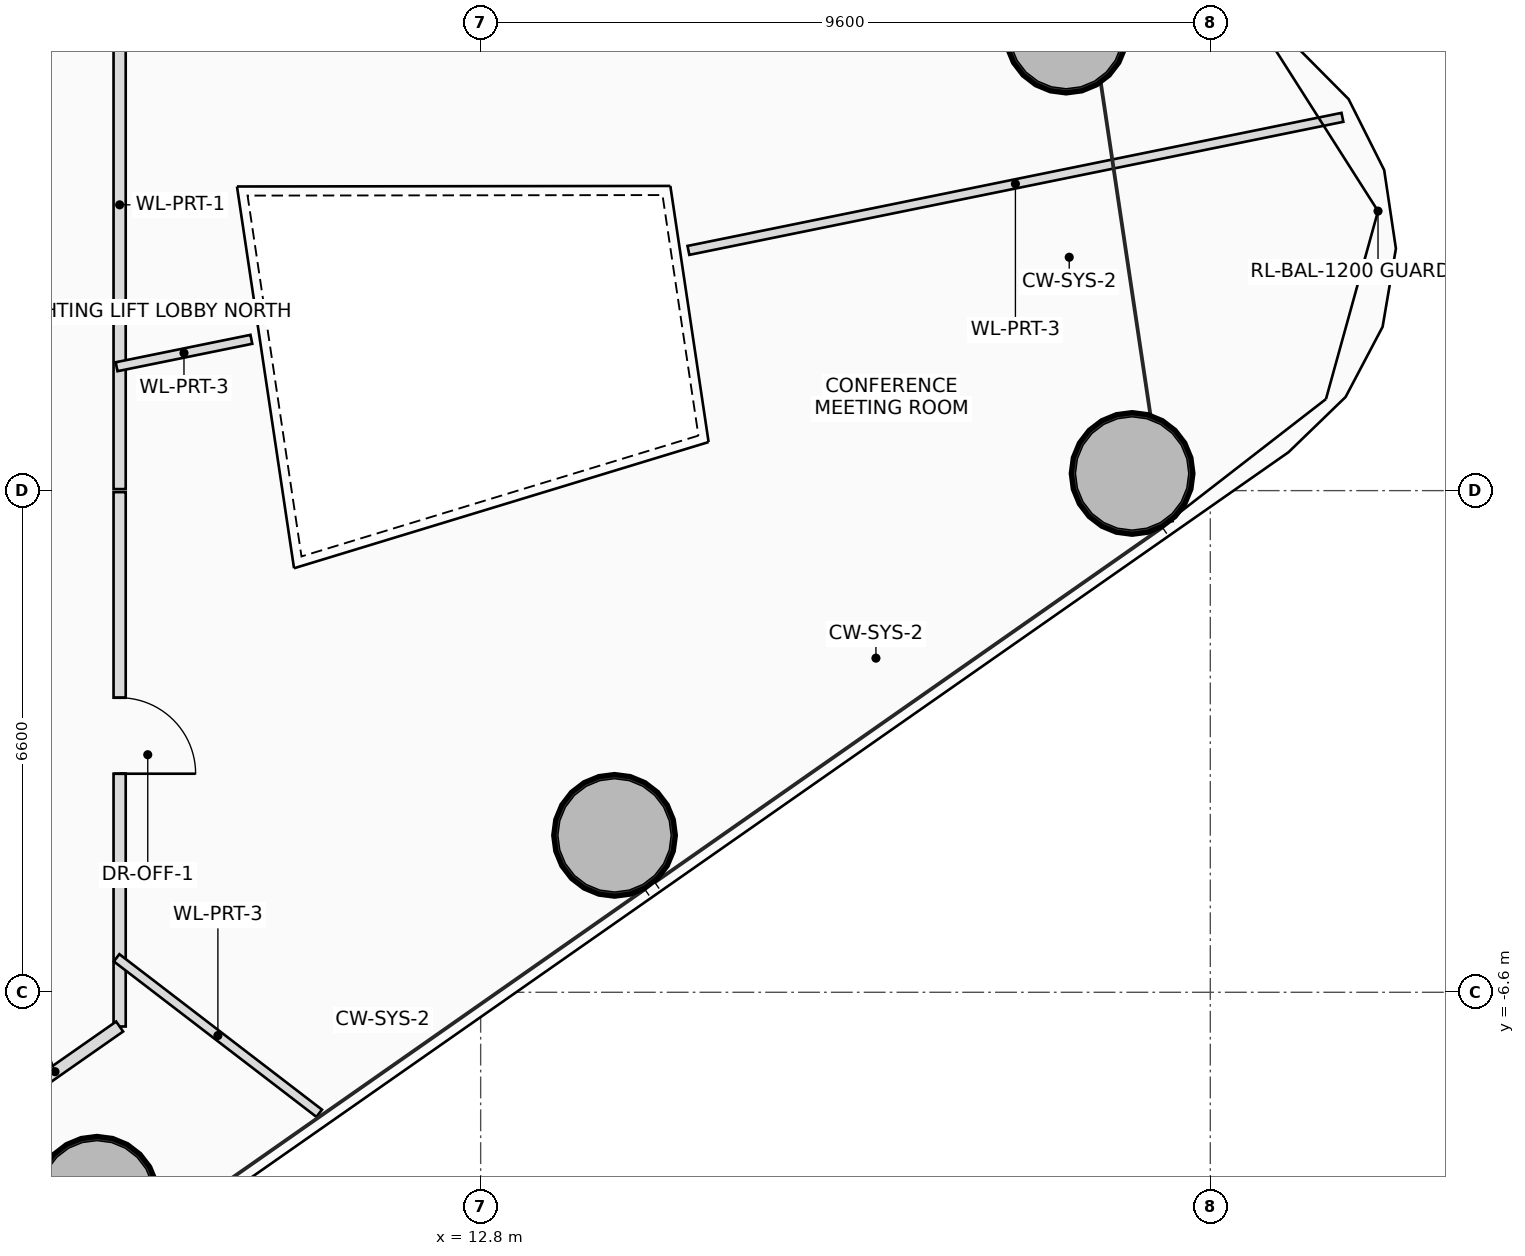
"""IFC4 building model, lengths in metres.
Left out: names, types, materials, properties, quantities, classifications, styles, units other than length and angle.
Written with IfcOpenShell. Run it as: python <this file> out.ifc"""

import sys

from ifc_helpers import new_model, si_unit, direction, frame, frame_2d, origin, origin_2d, place, context, subcontext, project, spatial, rectangle, hollow_circle, extrude, source, transform, mapped, element, fill, save


model = new_model("IFC4")
c1 = context("Model", 3, precision=1e-05, world=origin(), true_north=direction((0.0, 1.0)))
c2 = subcontext(c1, "Body", "Model", "MODEL_VIEW")
j1 = project(units=[si_unit("LENGTHUNIT", "METRE"), si_unit("PLANEANGLEUNIT", "RADIAN")], contexts=[c1])
p1 = place(None, origin())
s1 = spatial("IfcSite", under=j1, at=p1, CompositionType="ELEMENT")
p2 = place(p1, origin())
s2 = spatial("IfcBuilding", under=s1, at=p2, CompositionType="ELEMENT")
p3 = place(p2, frame((0.0, 0.0, 58.55)))
s3 = spatial("IfcBuildingStorey", under=s2, at=p3, CompositionType="ELEMENT", Elevation=58.55)
m1 = source(origin(), c2, "Body", "SweptSolid", [
    extrude(hollow_circle(Radius=0.8, WallThickness=0.055, at=origin_2d()), origin(), (0.0, 0.0, 1.0), 3.75),
])
for number, where, z_axis, x_axis in (
    (1, (7.752, -9.297, 0.0), (0.0, 0.0, 1.0), (1.0, 0.0, 0.0)),
    (2, (14.562, -4.535, 0.0), (0.0, 0.0, 1.0), (1.0, 0.0, 0.0)),
    (3, (21.371, 0.226, 0.0), (0.0, 0.0, 1.0), (1.0, 0.0, 0.0)),
    (4, (20.503, 6.032, 0.0), (0.0, 0.0, 1.0), (1.0, 0.0, 0.0)),
):
    element("IfcColumn", number, at=place(p3, frame(where, z_axis=z_axis, x_axis=x_axis)), inside=s3, PredefinedType="COLUMN", context=c2, shape_type="MappedRepresentation", body=[
        mapped(m1, transform((0.0, 0.0, 0.0), scale=1.0)),
    ])
p4 = place(p3, frame((8.05, 7.5, 0.0), z_axis=(0.0, 0.0, 1.0), x_axis=(0.0, -1.0, 0.0)))
e5 = element("IfcWall", 5, at=p4, inside=s3, PredefinedType="PARTITIONING", context=c2, shape_type="SweptSolid", body=[
    extrude(rectangle(XDim=7.48, YDim=0.16, at=frame_2d((3.74, 0.0))), origin(), (0.0, 0.0, 1.0), 2.85),
])
p5 = place(p3, frame((8.05, -0.02, 0.0), z_axis=(0.0, 0.0, 1.0), x_axis=(0.0, -1.0, 0.0)))
e6 = element("IfcWall", 6, at=p5, inside=s3, PredefinedType="PARTITIONING", context=c2, shape_type="SweptSolid", body=[
    extrude(rectangle(XDim=7.03, YDim=0.16, at=frame_2d((3.515, 0.0))), origin(), (0.0, 0.0, 1.0), 2.85),
])
p6 = place(p5, frame((2.705, 0.0, 0.0)))
e7 = element("IfcOpeningElement", 7, at=p6, cuts=e6, PredefinedType="OPENING", context=c2, shape_type="SweptSolid", body=[
    extrude(rectangle(XDim=1.0, YDim=2.25, at=frame_2d((0.5, 1.125))), frame((0.0, 0.09, 0.0), z_axis=(0.0, -1.0, 0.0), x_axis=(1.0, 0.0, 0.0)), (0.0, 0.0, 1.0), 0.18),
])
p7 = place(p3, frame((8.05, -7.05, 0.0), z_axis=(0.0, 0.0, 1.0), x_axis=(-0.819513816746, -0.573059424635, 0.0)))
e8 = element("IfcWall", 8, at=p7, inside=s3, PredefinedType="PARTITIONING", context=c2, shape_type="SweptSolid", body=[
    extrude(rectangle(XDim=2.074, YDim=0.16, at=frame_2d((1.037, 0.0))), origin(), (0.0, 0.0, 1.0), 2.85),
])
p8 = place(p3, frame((8.01, -6.146, 0.0), z_axis=(0.0, 0.0, 1.0), x_axis=(0.79333380799, -0.608786883153, 0.0)))
e9 = element("IfcWall", 9, at=p8, inside=s3, PredefinedType="PARTITIONING", context=c2, shape_type="SweptSolid", body=[
    extrude(rectangle(XDim=3.36, YDim=0.12, at=frame_2d((1.68, 0.0))), origin(), (0.0, 0.0, 1.0), 3.01),
])
p9 = place(p3, frame((8.01, 1.63, 0.0), z_axis=(0.0, 0.0, 1.0), x_axis=(0.979916112173, 0.199410162989, 0.0)))
e10 = element("IfcWall", 10, at=p9, inside=s3, PredefinedType="PARTITIONING", context=c2, shape_type="SweptSolid", body=[
    extrude(rectangle(XDim=1.81, YDim=0.12, at=frame_2d((0.905, 0.0))), origin(), (0.0, 0.0, 1.0), 3.21),
])
p10 = place(p3, frame((15.533, 3.16, 0.0), z_axis=(0.0, 0.0, 1.0), x_axis=(0.979928377953, 0.199349878562, 0.0)))
e11 = element("IfcWall", 11, at=p10, inside=s3, PredefinedType="PARTITIONING", context=c2, shape_type="SweptSolid", body=[
    extrude(rectangle(XDim=8.781, YDim=0.12, at=frame_2d((4.391, 0.0))), origin(), (0.0, 0.0, 1.0), 3.01),
])
p11 = place(p6, origin())
e12 = element("IfcDoor", 12, at=p11, inside=s3, OperationType="SINGLE_SWING_RIGHT", PredefinedType="DOOR", context=c2, shape_type="SweptSolid", body=[
    extrude(rectangle(XDim=1.0, YDim=2.25, at=frame_2d((0.5, 1.125))), frame((0.0, 0.025, 0.0), z_axis=(0.0, -1.0, 0.0), x_axis=(1.0, 0.0, 0.0)), (0.0, 0.0, 1.0), 0.05),
])
fill(e7, e12)
save(model, sys.argv[1])
